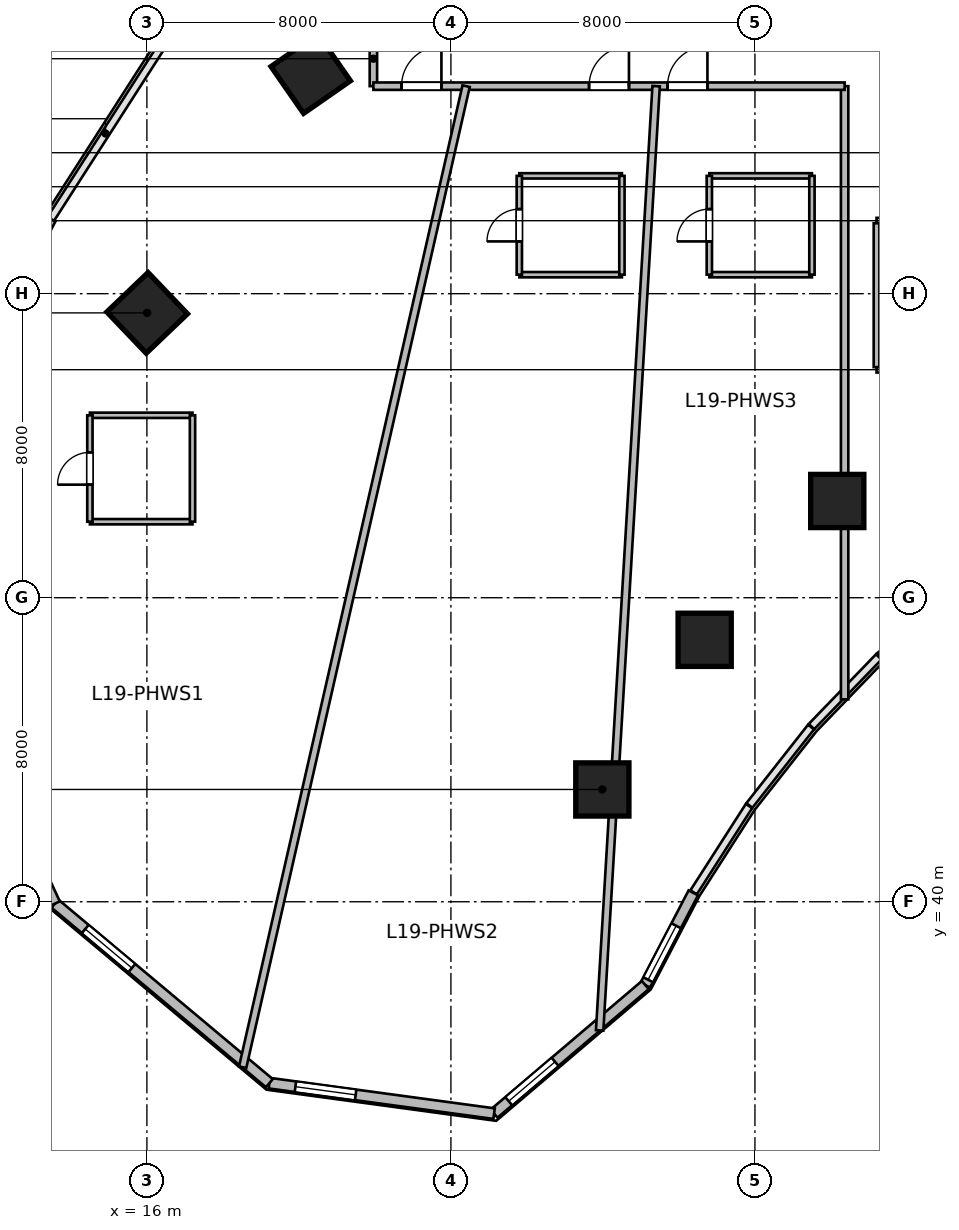
"""IFC4 building model, lengths in metres.
Left out: names, types, materials, properties, quantities, classifications, styles, units other than length and angle.
Written with IfcOpenShell. Run it as: python <this file> out.ifc"""

import sys

from ifc_helpers import new_model, si_unit, direction, frame, frame_2d, origin, origin_2d, place, context, subcontext, project, spatial, rectangle, circle, extrude, source, transform, mapped, element, fill, save


model = new_model("IFC4")
c1 = context("Model", 3, precision=1e-05, world=origin(), true_north=direction((0.0, 1.0)))
c2 = subcontext(c1, "Body", "Model", "MODEL_VIEW")
j1 = project(units=[si_unit("LENGTHUNIT", "METRE"), si_unit("PLANEANGLEUNIT", "RADIAN")], contexts=[c1])
p1 = place(None, origin())
s1 = spatial("IfcSite", under=j1, at=p1, CompositionType="ELEMENT")
p2 = place(p1, origin())
s2 = spatial("IfcBuilding", under=s1, at=p2, CompositionType="ELEMENT")
p3 = place(p2, frame((0.0, 0.0, 82.2)))
s3 = spatial("IfcBuildingStorey", under=s2, at=p3, CompositionType="ELEMENT", Elevation=82.2)
m1 = source(origin(), c2, "Body", "SweptSolid", [
    extrude(circle(Radius=0.7, at=origin_2d()), origin(), (0.0, 0.0, 1.0), 3.6),
])
p4 = place(p3, frame((27.985, 42.955, 0.0), z_axis=(0.0, 0.0, 1.0), x_axis=(-0.690756218984, 0.723087716626, 0.0)))
e1 = element("IfcColumn", 1, at=p4, inside=s3, PredefinedType="COLUMN", context=c2, shape_type="MappedRepresentation", body=[
    mapped(m1, transform((0.0, 0.0, 0.0), scale=1.0)),
])
m2 = source(origin(), c2, "Body", "SweptSolid", [
    extrude(rectangle(XDim=1.5, YDim=1.5, at=origin_2d()), origin(), (0.0, 0.0, 1.0), 3.6),
])
p5 = place(p3, frame((16.007, 55.494, 0.0), z_axis=(0.0, 0.0, 1.0), x_axis=(-0.690756218984, 0.723087716626, 0.0)))
e2 = element("IfcColumn", 2, at=p5, inside=s3, PredefinedType="COLUMN", context=c2, shape_type="MappedRepresentation", body=[
    mapped(m2, transform((0.0, 0.0, 0.0), scale=1.0)),
])
p6 = place(p3, frame((30.677, 46.892, 0.0), z_axis=(0.0, 0.0, 1.0), x_axis=(-0.571143442153, 0.820850271661, 0.0)))
e3 = element("IfcColumn", 3, at=p6, inside=s3, PredefinedType="COLUMN", context=c2, shape_type="MappedRepresentation", body=[
    mapped(m1, transform((0.0, 0.0, 0.0), scale=1.0)),
])
p7 = place(p3, frame((20.311, 61.789, 0.0), z_axis=(0.0, 0.0, 1.0), x_axis=(-0.571143442153, 0.820850271661, 0.0)))
e4 = element("IfcColumn", 4, at=p7, inside=s3, PredefinedType="COLUMN", context=c2, shape_type="MappedRepresentation", body=[
    mapped(m2, transform((0.0, 0.0, 0.0), scale=1.0)),
])
p8 = place(p3, frame((34.166, 50.545, 0.0), z_axis=(0.0, 0.0, 1.0), x_axis=(-0.436173672171, 0.899862504889, 0.0)))
e5 = element("IfcColumn", 5, at=p8, inside=s3, PredefinedType="COLUMN", context=c2, shape_type="MappedRepresentation", body=[
    mapped(m1, transform((0.0, 0.0, 0.0), scale=1.0)),
])
m3 = source(origin(), c2, "Body", "SweptSolid", [
    extrude(rectangle(XDim=2.735, YDim=0.28, at=frame_2d((1.368, 0.0))), origin(), (0.0, 0.0, 1.0), 3.28),
])
p9 = place(p3, frame((30.378, 40.234, 0.0), z_axis=(0.0, 0.0, 1.0), x_axis=(-0.46179107292, -0.886988728774, 0.0)))
e6 = element("IfcWall", 6, at=p9, inside=s3, PredefinedType="SOLIDWALL", context=c2, shape_type="MappedRepresentation", body=[
    mapped(m3, transform((0.0, 0.0, 0.0), scale=1.0)),
])
p10 = place(p9, frame((0.976, 0.0, 0.95)))
e7 = element("IfcOpeningElement", 7, at=p10, cuts=e6, PredefinedType="OPENING", context=c2, shape_type="SweptSolid", body=[
    extrude(rectangle(XDim=1.6, YDim=1.9, at=frame_2d((0.8, 0.95))), frame((0.0, 0.15, 0.0), z_axis=(0.0, -1.0, 0.0), x_axis=(1.0, 0.0, 0.0)), (0.0, 0.0, 1.0), 0.3),
])
m4 = source(origin(), c2, "Body", "SweptSolid", [
    extrude(rectangle(XDim=5.222, YDim=0.28, at=frame_2d((2.611, 0.0))), origin(), (0.0, 0.0, 1.0), 3.28),
])
p11 = place(p3, frame((29.115, 37.807, 0.0), z_axis=(0.0, 0.0, 1.0), x_axis=(-0.761900099546, -0.647694556339, 0.0)))
e8 = element("IfcWall", 8, at=p11, inside=s3, PredefinedType="SOLIDWALL", context=c2, shape_type="MappedRepresentation", body=[
    mapped(m4, transform((0.0, 0.0, 0.0), scale=1.0)),
])
p12 = place(p11, frame((3.117, 0.0, 0.95)))
e9 = element("IfcOpeningElement", 9, at=p12, cuts=e8, PredefinedType="OPENING", context=c2, shape_type="SweptSolid", body=[
    extrude(rectangle(XDim=1.6, YDim=1.9, at=frame_2d((0.8, 0.95))), frame((0.0, 0.15, 0.0), z_axis=(0.0, -1.0, 0.0), x_axis=(1.0, 0.0, 0.0)), (0.0, 0.0, 1.0), 0.3),
])
m5 = source(origin(), c2, "Body", "SweptSolid", [
    extrude(rectangle(XDim=5.967, YDim=0.28, at=frame_2d((2.984, 0.0))), origin(), (0.0, 0.0, 1.0), 3.28),
])
p13 = place(p3, frame((25.136, 34.425, 0.0), z_axis=(0.0, 0.0, 1.0), x_axis=(-0.990927009341, 0.134401124099, 0.0)))
e10 = element("IfcWall", 10, at=p13, inside=s3, PredefinedType="SOLIDWALL", context=c2, shape_type="MappedRepresentation", body=[
    mapped(m5, transform((0.0, 0.0, 0.0), scale=1.0)),
])
p14 = place(p13, frame((3.676, 0.0, 0.95)))
e11 = element("IfcOpeningElement", 11, at=p14, cuts=e10, PredefinedType="OPENING", context=c2, shape_type="SweptSolid", body=[
    extrude(rectangle(XDim=1.6, YDim=1.9, at=frame_2d((0.8, 0.95))), frame((0.0, 0.15, 0.0), z_axis=(0.0, -1.0, 0.0), x_axis=(1.0, 0.0, 0.0)), (0.0, 0.0, 1.0), 0.3),
])
m6 = source(origin(), c2, "Body", "SweptSolid", [
    extrude(rectangle(XDim=7.359, YDim=0.28, at=frame_2d((3.679, 0.0))), origin(), (0.0, 0.0, 1.0), 3.28),
])
p15 = place(p3, frame((19.223, 35.227, 0.0), z_axis=(0.0, 0.0, 1.0), x_axis=(-0.766737165543, 0.641961150675, 0.0)))
e12 = element("IfcWall", 12, at=p15, inside=s3, PredefinedType="SOLIDWALL", context=c2, shape_type="MappedRepresentation", body=[
    mapped(m6, transform((0.0, 0.0, 0.0), scale=1.0)),
])
p16 = place(p15, frame((4.719, 0.0, 0.95)))
e13 = element("IfcOpeningElement", 13, at=p16, cuts=e12, PredefinedType="OPENING", context=c2, shape_type="SweptSolid", body=[
    extrude(rectangle(XDim=1.6, YDim=1.9, at=frame_2d((0.8, 0.95))), frame((0.0, 0.15, 0.0), z_axis=(0.0, -1.0, 0.0), x_axis=(1.0, 0.0, 0.0)), (0.0, 0.0, 1.0), 0.3),
])
m7 = source(origin(), c2, "Body", "SweptSolid", [
    extrude(rectangle(XDim=7.536, YDim=0.28, at=frame_2d((3.768, 0.0))), origin(), (0.0, 0.0, 1.0), 3.28),
])
p17 = place(p3, frame((13.58, 39.951, 0.0), z_axis=(0.0, 0.0, 1.0), x_axis=(-0.41964973873, 0.907686122393, 0.0)))
e14 = element("IfcWall", 14, at=p17, inside=s3, PredefinedType="SOLIDWALL", context=c2, shape_type="MappedRepresentation", body=[
    mapped(m7, transform((0.0, 0.0, 0.0), scale=1.0)),
])
p18 = place(p17, frame((1.084, 0.0, 0.95)))
e15 = element("IfcOpeningElement", 15, at=p18, cuts=e14, PredefinedType="OPENING", context=c2, shape_type="SweptSolid", body=[
    extrude(rectangle(XDim=1.6, YDim=1.9, at=frame_2d((0.8, 0.95))), frame((0.0, 0.15, 0.0), z_axis=(0.0, -1.0, 0.0), x_axis=(1.0, 0.0, 0.0)), (0.0, 0.0, 1.0), 0.3),
])
m8 = source(origin(), c2, "Body", "SweptSolid", [
    extrude(rectangle(XDim=5.459, YDim=0.28, at=frame_2d((2.73, 0.0))), origin(), (0.0, 0.0, 1.0), 3.28),
])
p19 = place(p3, frame((10.947, 53.122, 0.0), z_axis=(0.0, 0.0, 1.0), x_axis=(0.461768054321, 0.887000712518, 0.0)))
e16 = element("IfcWall", 16, at=p19, inside=s3, PredefinedType="SOLIDWALL", context=c2, shape_type="MappedRepresentation", body=[
    mapped(m8, transform((0.0, 0.0, 0.0), scale=1.0)),
])
p20 = place(p19, frame((0.565, 0.0, 0.95)))
e17 = element("IfcOpeningElement", 17, at=p20, cuts=e16, PredefinedType="OPENING", context=c2, shape_type="SweptSolid", body=[
    extrude(rectangle(XDim=1.6, YDim=1.9, at=frame_2d((0.8, 0.95))), frame((0.0, 0.15, 0.0), z_axis=(0.0, -1.0, 0.0), x_axis=(1.0, 0.0, 0.0)), (0.0, 0.0, 1.0), 0.3),
])
m9 = source(origin(), c2, "Body", "SweptSolid", [
    extrude(rectangle(XDim=2.58, YDim=0.195, at=frame_2d((1.29, 0.0))), origin(), (0.0, 0.0, 1.0), 3.28),
])
p21 = place(p3, frame((21.96, 61.46, 0.0), z_axis=(0.0, 0.0, 1.0), x_axis=(0.0, 1.0, 0.0)))
e18 = element("IfcWall", 18, at=p21, inside=s3, PredefinedType="PARTITIONING", context=c2, shape_type="MappedRepresentation", body=[
    mapped(m9, transform((0.0, 0.0, 0.0), scale=1.0)),
])
m10 = source(origin(), c2, "Body", "SweptSolid", [
    extrude(rectangle(XDim=6.6, YDim=0.15, at=frame_2d((3.3, 0.0))), origin(), (0.0, 0.0, 1.0), 2.723),
])
p22 = place(p3, frame((35.2, 54.0, 0.0), z_axis=(0.0, 0.0, 1.0), x_axis=(1.0, 0.0, 0.0)))
e19 = element("IfcWall", 19, at=p22, inside=s3, PredefinedType="PARTITIONING", context=c2, shape_type="MappedRepresentation", body=[
    mapped(m10, transform((0.0, 0.0, 0.0), scale=1.0)),
])
m11 = source(origin(), c2, "Body", "SweptSolid", [
    extrude(rectangle(XDim=6.6, YDim=0.15, at=frame_2d((3.3, 0.0))), origin(), (0.0, 0.0, 1.0), 3.28),
])
p23 = place(p3, frame((35.2, 57.92, 0.0), z_axis=(0.0, 0.0, 1.0), x_axis=(1.0, 0.0, 0.0)))
e20 = element("IfcWall", 20, at=p23, inside=s3, PredefinedType="PARTITIONING", context=c2, shape_type="MappedRepresentation", body=[
    mapped(m11, transform((0.0, 0.0, 0.0), scale=1.0)),
])
p24 = place(p23, frame((2.85, 0.0, 0.0)))
e21 = element("IfcOpeningElement", 21, at=p24, cuts=e20, PredefinedType="OPENING", context=c2, shape_type="SweptSolid", body=[
    extrude(rectangle(XDim=0.9, YDim=2.1, at=frame_2d((0.45, 1.05))), frame((0.0, 0.085, 0.0), z_axis=(0.0, -1.0, 0.0), x_axis=(1.0, 0.0, 0.0)), (0.0, 0.0, 1.0), 0.17),
])
m12 = source(origin(), c2, "Body", "SweptSolid", [
    extrude(rectangle(XDim=3.785, YDim=0.15, at=frame_2d((1.893, 0.0))), origin(), (0.0, 0.0, 1.0), 3.28),
])
p25 = place(p3, frame((35.2, 54.067, 0.0), z_axis=(0.0, 0.0, 1.0), x_axis=(0.0, 1.0, 0.0)))
e22 = element("IfcWall", 22, at=p25, inside=s3, PredefinedType="PARTITIONING", context=c2, shape_type="MappedRepresentation", body=[
    mapped(m12, transform((0.0, 0.0, 0.0), scale=1.0)),
])
m13 = source(origin(), c2, "Body", "SweptSolid", [
    extrude(rectangle(XDim=16.134, YDim=0.195, at=frame_2d((8.067, 0.0))), origin(), (0.0, 0.0, 1.0), 3.28),
])
p26 = place(p3, frame((34.36, 45.326, 0.0), z_axis=(0.0, 0.0, 1.0), x_axis=(0.0, 1.0, 0.0)))
e23 = element("IfcWall", 23, at=p26, inside=s3, PredefinedType="PARTITIONING", context=c2, shape_type="MappedRepresentation", body=[
    mapped(m13, transform((0.0, 0.0, 0.0), scale=1.0)),
])
m14 = source(origin(), c2, "Body", "SweptSolid", [
    extrude(rectangle(XDim=12.4, YDim=0.195, at=frame_2d((6.2, 0.0))), origin(), (0.0, 0.0, 1.0), 3.28),
])
p27 = place(p3, frame((21.96, 61.46, 0.0), z_axis=(0.0, 0.0, 1.0), x_axis=(1.0, 0.0, 0.0)))
e24 = element("IfcWall", 24, at=p27, inside=s3, PredefinedType="PARTITIONING", context=c2, shape_type="MappedRepresentation", body=[
    mapped(m14, transform((0.0, 0.0, 0.0), scale=1.0)),
])
p28 = place(p27, frame((0.74, 0.0, 0.0)))
e25 = element("IfcOpeningElement", 25, at=p28, cuts=e24, PredefinedType="OPENING", context=c2, shape_type="SweptSolid", body=[
    extrude(rectangle(XDim=1.05, YDim=2.15, at=frame_2d((0.525, 1.075))), frame((0.0, 0.107, 0.0), z_axis=(0.0, -1.0, 0.0), x_axis=(1.0, 0.0, 0.0)), (0.0, 0.0, 1.0), 0.215),
])
p29 = place(p27, frame((5.675, 0.0, 0.0)))
e26 = element("IfcOpeningElement", 26, at=p29, cuts=e24, PredefinedType="OPENING", context=c2, shape_type="SweptSolid", body=[
    extrude(rectangle(XDim=1.05, YDim=2.15, at=frame_2d((0.525, 1.075))), frame((0.0, 0.107, 0.0), z_axis=(0.0, -1.0, 0.0), x_axis=(1.0, 0.0, 0.0)), (0.0, 0.0, 1.0), 0.215),
])
p30 = place(p27, frame((7.74, 0.0, 0.0)))
e27 = element("IfcOpeningElement", 27, at=p30, cuts=e24, PredefinedType="OPENING", context=c2, shape_type="SweptSolid", body=[
    extrude(rectangle(XDim=1.05, YDim=2.15, at=frame_2d((0.525, 1.075))), frame((0.0, 0.107, 0.0), z_axis=(0.0, -1.0, 0.0), x_axis=(1.0, 0.0, 0.0)), (0.0, 0.0, 1.0), 0.215),
])
m15 = source(origin(), c2, "Body", "SweptSolid", [
    extrude(rectangle(XDim=26.476, YDim=0.195, at=frame_2d((13.238, 0.0))), origin(), (0.0, 0.0, 1.0), 2.847),
])
p31 = place(p3, frame((18.52, 35.646, 0.0), z_axis=(0.0, 0.0, 1.0), x_axis=(0.22210613157, 0.975022495289, 0.0)))
e28 = element("IfcWall", 28, at=p31, inside=s3, PredefinedType="PARTITIONING", context=c2, shape_type="MappedRepresentation", body=[
    mapped(m15, transform((0.0, 0.0, 0.0), scale=1.0)),
])
m16 = source(origin(), c2, "Body", "SweptSolid", [
    extrude(rectangle(XDim=24.889, YDim=0.195, at=frame_2d((12.444, 0.0))), origin(), (0.0, 0.0, 1.0), 2.564),
])
p32 = place(p3, frame((27.914, 36.616, 0.0), z_axis=(0.0, 0.0, 1.0), x_axis=(0.059709317989, 0.998215807, 0.0)))
e29 = element("IfcWall", 29, at=p32, inside=s3, PredefinedType="PARTITIONING", context=c2, shape_type="MappedRepresentation", body=[
    mapped(m16, transform((0.0, 0.0, 0.0), scale=1.0)),
])
m17 = source(origin(), c2, "Body", "SweptSolid", [
    extrude(rectangle(XDim=2.7, YDim=0.14, at=frame_2d((1.35, 0.0))), origin(), (0.0, 0.0, 1.0), 3.28),
])
for number, where, z_axis, x_axis in (
    (30, (14.5, 52.8, 0.0), (0.0, 0.0, 1.0), (1.0, 0.0, 0.0)),
    (31, (14.5, 50.0, 0.0), (0.0, 0.0, 1.0), (1.0, 0.0, 0.0)),
):
    element("IfcWall", number, at=place(p3, frame(where, z_axis=z_axis, x_axis=x_axis)), inside=s3, PredefinedType="PARTITIONING", context=c2, shape_type="MappedRepresentation", body=[
        mapped(m17, transform((0.0, 0.0, 0.0), scale=1.0)),
    ])
m18 = source(origin(), c2, "Body", "SweptSolid", [
    extrude(rectangle(XDim=2.8, YDim=0.14, at=frame_2d((1.4, 0.0))), origin(), (0.0, 0.0, 1.0), 3.28),
])
p33 = place(p3, frame((14.5, 50.0, 0.0), z_axis=(0.0, 0.0, 1.0), x_axis=(0.0, 1.0, 0.0)))
e32 = element("IfcWall", 32, at=p33, inside=s3, PredefinedType="PARTITIONING", context=c2, shape_type="MappedRepresentation", body=[
    mapped(m18, transform((0.0, 0.0, 0.0), scale=1.0)),
])
p34 = place(p33, frame((0.975, 0.0, 0.0)))
e33 = element("IfcOpeningElement", 33, at=p34, cuts=e32, PredefinedType="OPENING", context=c2, shape_type="SweptSolid", body=[
    extrude(rectangle(XDim=0.85, YDim=2.05, at=frame_2d((0.425, 1.025))), frame((0.0, 0.08, 0.0), z_axis=(0.0, -1.0, 0.0), x_axis=(1.0, 0.0, 0.0)), (0.0, 0.0, 1.0), 0.16),
])
p35 = place(p3, frame((17.2, 50.0, 0.0), z_axis=(0.0, 0.0, 1.0), x_axis=(0.0, 1.0, 0.0)))
e34 = element("IfcWall", 34, at=p35, inside=s3, PredefinedType="PARTITIONING", context=c2, shape_type="MappedRepresentation", body=[
    mapped(m18, transform((0.0, 0.0, 0.0), scale=1.0)),
])
for number, where, z_axis, x_axis in (
    (35, (25.8, 59.1, 0.0), (0.0, 0.0, 1.0), (1.0, 0.0, 0.0)),
    (36, (25.8, 56.5, 0.0), (0.0, 0.0, 1.0), (1.0, 0.0, 0.0)),
):
    element("IfcWall", number, at=place(p3, frame(where, z_axis=z_axis, x_axis=x_axis)), inside=s3, PredefinedType="PARTITIONING", context=c2, shape_type="MappedRepresentation", body=[
        mapped(m17, transform((0.0, 0.0, 0.0), scale=1.0)),
    ])
m19 = source(origin(), c2, "Body", "SweptSolid", [
    extrude(rectangle(XDim=2.6, YDim=0.14, at=frame_2d((1.3, 0.0))), origin(), (0.0, 0.0, 1.0), 3.28),
])
p36 = place(p3, frame((25.8, 56.5, 0.0), z_axis=(0.0, 0.0, 1.0), x_axis=(0.0, 1.0, 0.0)))
e37 = element("IfcWall", 37, at=p36, inside=s3, PredefinedType="PARTITIONING", context=c2, shape_type="MappedRepresentation", body=[
    mapped(m19, transform((0.0, 0.0, 0.0), scale=1.0)),
])
p37 = place(p36, frame((0.875, 0.0, 0.0)))
e38 = element("IfcOpeningElement", 38, at=p37, cuts=e37, PredefinedType="OPENING", context=c2, shape_type="SweptSolid", body=[
    extrude(rectangle(XDim=0.85, YDim=2.05, at=frame_2d((0.425, 1.025))), frame((0.0, 0.08, 0.0), z_axis=(0.0, -1.0, 0.0), x_axis=(1.0, 0.0, 0.0)), (0.0, 0.0, 1.0), 0.16),
])
m20 = source(origin(), c2, "Body", "SweptSolid", [
    extrude(rectangle(XDim=2.6, YDim=0.14, at=frame_2d((1.3, 0.0))), origin(), (0.0, 0.0, 1.0), 2.847),
])
p38 = place(p3, frame((28.5, 56.5, 0.0), z_axis=(0.0, 0.0, 1.0), x_axis=(0.0, 1.0, 0.0)))
e39 = element("IfcWall", 39, at=p38, inside=s3, PredefinedType="PARTITIONING", context=c2, shape_type="MappedRepresentation", body=[
    mapped(m20, transform((0.0, 0.0, 0.0), scale=1.0)),
])
for number, where, z_axis, x_axis in (
    (40, (30.8, 59.1, 0.0), (0.0, 0.0, 1.0), (1.0, 0.0, 0.0)),
    (41, (30.8, 56.5, 0.0), (0.0, 0.0, 1.0), (1.0, 0.0, 0.0)),
):
    element("IfcWall", number, at=place(p3, frame(where, z_axis=z_axis, x_axis=x_axis)), inside=s3, PredefinedType="PARTITIONING", context=c2, shape_type="MappedRepresentation", body=[
        mapped(m17, transform((0.0, 0.0, 0.0), scale=1.0)),
    ])
m21 = source(origin(), c2, "Body", "SweptSolid", [
    extrude(rectangle(XDim=2.6, YDim=0.14, at=frame_2d((1.3, 0.0))), origin(), (0.0, 0.0, 1.0), 2.564),
])
p39 = place(p3, frame((30.8, 56.5, 0.0), z_axis=(0.0, 0.0, 1.0), x_axis=(0.0, 1.0, 0.0)))
e42 = element("IfcWall", 42, at=p39, inside=s3, PredefinedType="PARTITIONING", context=c2, shape_type="MappedRepresentation", body=[
    mapped(m21, transform((0.0, 0.0, 0.0), scale=1.0)),
])
p40 = place(p39, frame((0.875, 0.0, 0.0)))
e43 = element("IfcOpeningElement", 43, at=p40, cuts=e42, PredefinedType="OPENING", context=c2, shape_type="SweptSolid", body=[
    extrude(rectangle(XDim=0.85, YDim=2.05, at=frame_2d((0.425, 1.025))), frame((0.0, 0.08, 0.0), z_axis=(0.0, -1.0, 0.0), x_axis=(1.0, 0.0, 0.0)), (0.0, 0.0, 1.0), 0.16),
])
p41 = place(p3, frame((33.5, 56.5, 0.0), z_axis=(0.0, 0.0, 1.0), x_axis=(0.0, 1.0, 0.0)))
e44 = element("IfcWall", 44, at=p41, inside=s3, PredefinedType="PARTITIONING", context=c2, shape_type="MappedRepresentation", body=[
    mapped(m19, transform((0.0, 0.0, 0.0), scale=1.0)),
])
m22 = source(origin(), c2, "Body", "SweptSolid", [
    extrude(rectangle(XDim=1.6, YDim=1.9, at=frame_2d((0.8, 0.95))), frame((0.0, 0.03, 0.0), z_axis=(0.0, -1.0, 0.0), x_axis=(1.0, 0.0, 0.0)), (0.0, 0.0, 1.0), 0.06),
])
p42 = place(p10, origin())
e45 = element("IfcWindow", 45, at=p42, inside=s3, PartitioningType="SINGLE_PANEL", PredefinedType="WINDOW", context=c2, shape_type="MappedRepresentation", body=[
    mapped(m22, transform((0.0, 0.0, 0.0), scale=1.0)),
])
fill(e7, e45)
p43 = place(p12, origin())
e46 = element("IfcWindow", 46, at=p43, inside=s3, PartitioningType="SINGLE_PANEL", PredefinedType="WINDOW", context=c2, shape_type="MappedRepresentation", body=[
    mapped(m22, transform((0.0, 0.0, 0.0), scale=1.0)),
])
fill(e9, e46)
p44 = place(p14, origin())
e47 = element("IfcWindow", 47, at=p44, inside=s3, PartitioningType="SINGLE_PANEL", PredefinedType="WINDOW", context=c2, shape_type="MappedRepresentation", body=[
    mapped(m22, transform((0.0, 0.0, 0.0), scale=1.0)),
])
fill(e11, e47)
p45 = place(p16, origin())
e48 = element("IfcWindow", 48, at=p45, inside=s3, PartitioningType="SINGLE_PANEL", PredefinedType="WINDOW", context=c2, shape_type="MappedRepresentation", body=[
    mapped(m22, transform((0.0, 0.0, 0.0), scale=1.0)),
])
fill(e13, e48)
m23 = source(origin(), c2, "Body", "SweptSolid", [
    extrude(rectangle(XDim=1.05, YDim=2.15, at=frame_2d((0.525, 1.075))), frame((0.0, 0.025, 0.0), z_axis=(0.0, -1.0, 0.0), x_axis=(1.0, 0.0, 0.0)), (0.0, 0.0, 1.0), 0.05),
])
p46 = place(p28, origin())
e49 = element("IfcDoor", 49, at=p46, inside=s3, OperationType="SINGLE_SWING_RIGHT", PredefinedType="DOOR", context=c2, shape_type="MappedRepresentation", body=[
    mapped(m23, transform((0.0, 0.0, 0.0), scale=1.0)),
])
fill(e25, e49)
m24 = source(origin(), c2, "Body", "SweptSolid", [
    extrude(rectangle(XDim=0.85, YDim=2.05, at=frame_2d((0.425, 1.025))), frame((0.0, 0.025, 0.0), z_axis=(0.0, -1.0, 0.0), x_axis=(1.0, 0.0, 0.0)), (0.0, 0.0, 1.0), 0.05),
])
p47 = place(p34, origin())
e50 = element("IfcDoor", 50, at=p47, inside=s3, OperationType="SINGLE_SWING_LEFT", PredefinedType="DOOR", context=c2, shape_type="MappedRepresentation", body=[
    mapped(m24, transform((0.0, 0.0, 0.0), scale=1.0)),
])
fill(e33, e50)
p48 = place(p29, origin())
e51 = element("IfcDoor", 51, at=p48, inside=s3, OperationType="SINGLE_SWING_RIGHT", PredefinedType="DOOR", context=c2, shape_type="MappedRepresentation", body=[
    mapped(m23, transform((0.0, 0.0, 0.0), scale=1.0)),
])
fill(e26, e51)
p49 = place(p37, origin())
e52 = element("IfcDoor", 52, at=p49, inside=s3, OperationType="SINGLE_SWING_LEFT", PredefinedType="DOOR", context=c2, shape_type="MappedRepresentation", body=[
    mapped(m24, transform((0.0, 0.0, 0.0), scale=1.0)),
])
fill(e38, e52)
p50 = place(p30, origin())
e53 = element("IfcDoor", 53, at=p50, inside=s3, OperationType="SINGLE_SWING_RIGHT", PredefinedType="DOOR", context=c2, shape_type="MappedRepresentation", body=[
    mapped(m23, transform((0.0, 0.0, 0.0), scale=1.0)),
])
fill(e27, e53)
p51 = place(p40, origin())
e54 = element("IfcDoor", 54, at=p51, inside=s3, OperationType="SINGLE_SWING_LEFT", PredefinedType="DOOR", context=c2, shape_type="MappedRepresentation", body=[
    mapped(m24, transform((0.0, 0.0, 0.0), scale=1.0)),
])
fill(e43, e54)
save(model, sys.argv[1])
